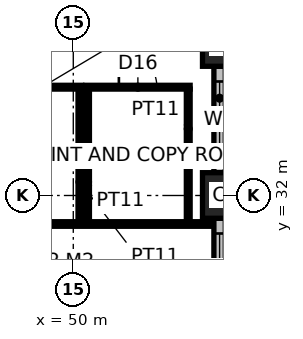
"""IFC4 building model, lengths in metres.
Left out: names, types, materials, properties, quantities, classifications, styles, units other than length and angle.
Written with IfcOpenShell. Run it as: python <this file> out.ifc"""

import sys

from ifc_helpers import new_model, si_unit, direction, frame, frame_2d, origin, origin_2d, place, context, subcontext, project, spatial, rectangle, hollow_rectangle, extrude, element, fill, save


model = new_model("IFC4")
c1 = context("Model", 3, precision=1e-05, world=origin(), true_north=direction((0.0, 1.0)))
c2 = subcontext(c1, "Body", "Model", "MODEL_VIEW")
j1 = project(units=[si_unit("LENGTHUNIT", "METRE"), si_unit("PLANEANGLEUNIT", "RADIAN")], contexts=[c1])
p1 = place(None, origin())
s1 = spatial("IfcSite", under=j1, at=p1, CompositionType="ELEMENT")
p2 = place(p1, origin())
s2 = spatial("IfcBuilding", under=s1, at=p2, CompositionType="ELEMENT")
p3 = place(p2, frame((0.0, 0.0, 47.0)))
s3 = spatial("IfcBuildingStorey", under=s2, at=p3, CompositionType="ELEMENT", Elevation=47.0)
for number, where, z_axis, x_axis in (
    (1, (54.0, 32.0, 0.0), (0.0, 0.0, 1.0), (1.0, 0.0, 0.0)),
    (2, (54.0, 36.0, 0.0), (0.0, 0.0, 1.0), (1.0, 0.0, 0.0)),
):
    element("IfcColumn", number, at=place(p3, frame(where, z_axis=z_axis, x_axis=x_axis)), inside=s3, PredefinedType="COLUMN", context=c2, shape_type="SweptSolid", body=[
        extrude(hollow_rectangle(XDim=1.2, YDim=1.2, WallThickness=0.1, at=origin_2d()), origin(), (0.0, 0.0, 1.0), 4.0),
    ])
p4 = place(p3, frame((44.375, 31.25, 0.0), z_axis=(0.0, 0.0, 1.0), x_axis=(1.0, 0.0, 0.0)))
e3 = element("IfcWall", 3, at=p4, inside=s3, PredefinedType="PARTITIONING", context=c2, shape_type="SweptSolid", body=[
    extrude(rectangle(XDim=9.325, YDim=0.12, at=frame_2d((4.663, 0.0))), origin(), (0.0, 0.0, 1.0), 3.85),
])
p5 = place(p3, frame((46.725, 34.85, 0.0), z_axis=(0.0, 0.0, 1.0), x_axis=(1.0, 0.0, 0.0)))
e4 = element("IfcWall", 4, at=p5, inside=s3, PredefinedType="PARTITIONING", context=c2, shape_type="SweptSolid", body=[
    extrude(rectangle(XDim=3.5, YDim=0.1, at=frame_2d((1.75, 0.0))), origin(), (0.0, 0.0, 1.0), 3.85),
])
p6 = place(p5, frame((1.25, 0.0, 0.0)))
e5 = element("IfcOpeningElement", 5, at=p6, cuts=e4, PredefinedType="OPENING", context=c2, shape_type="SweptSolid", body=[
    extrude(rectangle(XDim=1.0, YDim=2.2, at=frame_2d((0.5, 1.1))), frame((0.0, 0.06, 0.0), z_axis=(0.0, -1.0, 0.0), x_axis=(1.0, 0.0, 0.0)), (0.0, 0.0, 1.0), 0.12),
])
p7 = place(p3, frame((50.325, 34.85, 0.0), z_axis=(0.0, 0.0, 1.0), x_axis=(1.0, 0.0, 0.0)))
e6 = element("IfcWall", 6, at=p7, inside=s3, PredefinedType="PARTITIONING", context=c2, shape_type="SweptSolid", body=[
    extrude(rectangle(XDim=2.75, YDim=0.1, at=frame_2d((1.375, 0.0))), origin(), (0.0, 0.0, 1.0), 3.85),
])
p8 = place(p7, frame((0.875, 0.0, 0.0)))
e7 = element("IfcOpeningElement", 7, at=p8, cuts=e6, PredefinedType="OPENING", context=c2, shape_type="SweptSolid", body=[
    extrude(rectangle(XDim=1.0, YDim=2.2, at=frame_2d((0.5, 1.1))), frame((0.0, 0.06, 0.0), z_axis=(0.0, -1.0, 0.0), x_axis=(1.0, 0.0, 0.0)), (0.0, 0.0, 1.0), 0.12),
])
for number, where, z_axis, x_axis in (
    (8, (50.175, 31.31, 0.0), (0.0, 0.0, 1.0), (0.0, 1.0, 0.0)),
    (9, (50.375, 31.31, 0.0), (0.0, 0.0, 1.0), (0.0, 1.0, 0.0)),
    (10, (53.025, 31.31, 0.0), (0.0, 0.0, 1.0), (0.0, 1.0, 0.0)),
):
    element("IfcWall", number, at=place(p3, frame(where, z_axis=z_axis, x_axis=x_axis)), inside=s3, PredefinedType="PARTITIONING", context=c2, shape_type="SweptSolid", body=[
        extrude(rectangle(XDim=3.49, YDim=0.1, at=frame_2d((1.745, 0.0))), origin(), (0.0, 0.0, 1.0), 3.85),
    ])
p9 = place(p3, frame((53.85, 28.6, 0.0), z_axis=(0.0, 0.0, 1.0), x_axis=(0.0, 1.0, 0.0)))
e11 = element("IfcWall", 11, at=p9, inside=s3, PredefinedType="ELEMENTEDWALL", context=c2, shape_type="SweptSolid", body=[
    extrude(rectangle(XDim=2.8, YDim=0.3, at=frame_2d((1.4, 0.0))), origin(), (0.0, 0.0, 1.0), 2.85),
])
p10 = place(p9, frame((0.4, 0.0, 0.8)))
e12 = element("IfcOpeningElement", 12, at=p10, cuts=e11, PredefinedType="OPENING", context=c2, shape_type="SweptSolid", body=[
    extrude(rectangle(XDim=2.0, YDim=2.0, at=frame_2d((1.0, 1.0))), frame((0.0, 0.16, 0.0), z_axis=(0.0, -1.0, 0.0), x_axis=(1.0, 0.0, 0.0)), (0.0, 0.0, 1.0), 0.32),
])
p11 = place(p3, frame((53.85, 32.6, 0.0), z_axis=(0.0, 0.0, 1.0), x_axis=(0.0, 1.0, 0.0)))
e13 = element("IfcWall", 13, at=p11, inside=s3, PredefinedType="ELEMENTEDWALL", context=c2, shape_type="SweptSolid", body=[
    extrude(rectangle(XDim=2.8, YDim=0.3, at=frame_2d((1.4, 0.0))), origin(), (0.0, 0.0, 1.0), 2.85),
])
p12 = place(p11, frame((0.4, 0.0, 0.8)))
e14 = element("IfcOpeningElement", 14, at=p12, cuts=e13, PredefinedType="OPENING", context=c2, shape_type="SweptSolid", body=[
    extrude(rectangle(XDim=2.0, YDim=2.0, at=frame_2d((1.0, 1.0))), frame((0.0, 0.16, 0.0), z_axis=(0.0, -1.0, 0.0), x_axis=(1.0, 0.0, 0.0)), (0.0, 0.0, 1.0), 0.32),
])
p13 = place(p8, origin())
e15 = element("IfcDoor", 15, at=p13, inside=s3, OperationType="SINGLE_SWING_LEFT", PredefinedType="DOOR", context=c2, shape_type="SweptSolid", body=[
    extrude(rectangle(XDim=1.0, YDim=2.2, at=frame_2d((0.5, 1.1))), frame((0.0, 0.025, 0.0), z_axis=(0.0, -1.0, 0.0), x_axis=(1.0, 0.0, 0.0)), (0.0, 0.0, 1.0), 0.05),
])
fill(e7, e15)
p14 = place(p10, origin())
e16 = element("IfcWindow", 16, at=p14, inside=s3, PartitioningType="SINGLE_PANEL", PredefinedType="WINDOW", context=c2, shape_type="SweptSolid", body=[
    extrude(rectangle(XDim=2.0, YDim=2.0, at=frame_2d((1.0, 1.0))), frame((0.0, 0.03, 0.0), z_axis=(0.0, -1.0, 0.0), x_axis=(1.0, 0.0, 0.0)), (0.0, 0.0, 1.0), 0.06),
])
fill(e12, e16)
p15 = place(p12, origin())
e17 = element("IfcWindow", 17, at=p15, inside=s3, PartitioningType="SINGLE_PANEL", PredefinedType="WINDOW", context=c2, shape_type="SweptSolid", body=[
    extrude(rectangle(XDim=2.0, YDim=2.0, at=frame_2d((1.0, 1.0))), frame((0.0, 0.03, 0.0), z_axis=(0.0, -1.0, 0.0), x_axis=(1.0, 0.0, 0.0)), (0.0, 0.0, 1.0), 0.06),
])
fill(e14, e17)
save(model, sys.argv[1])
